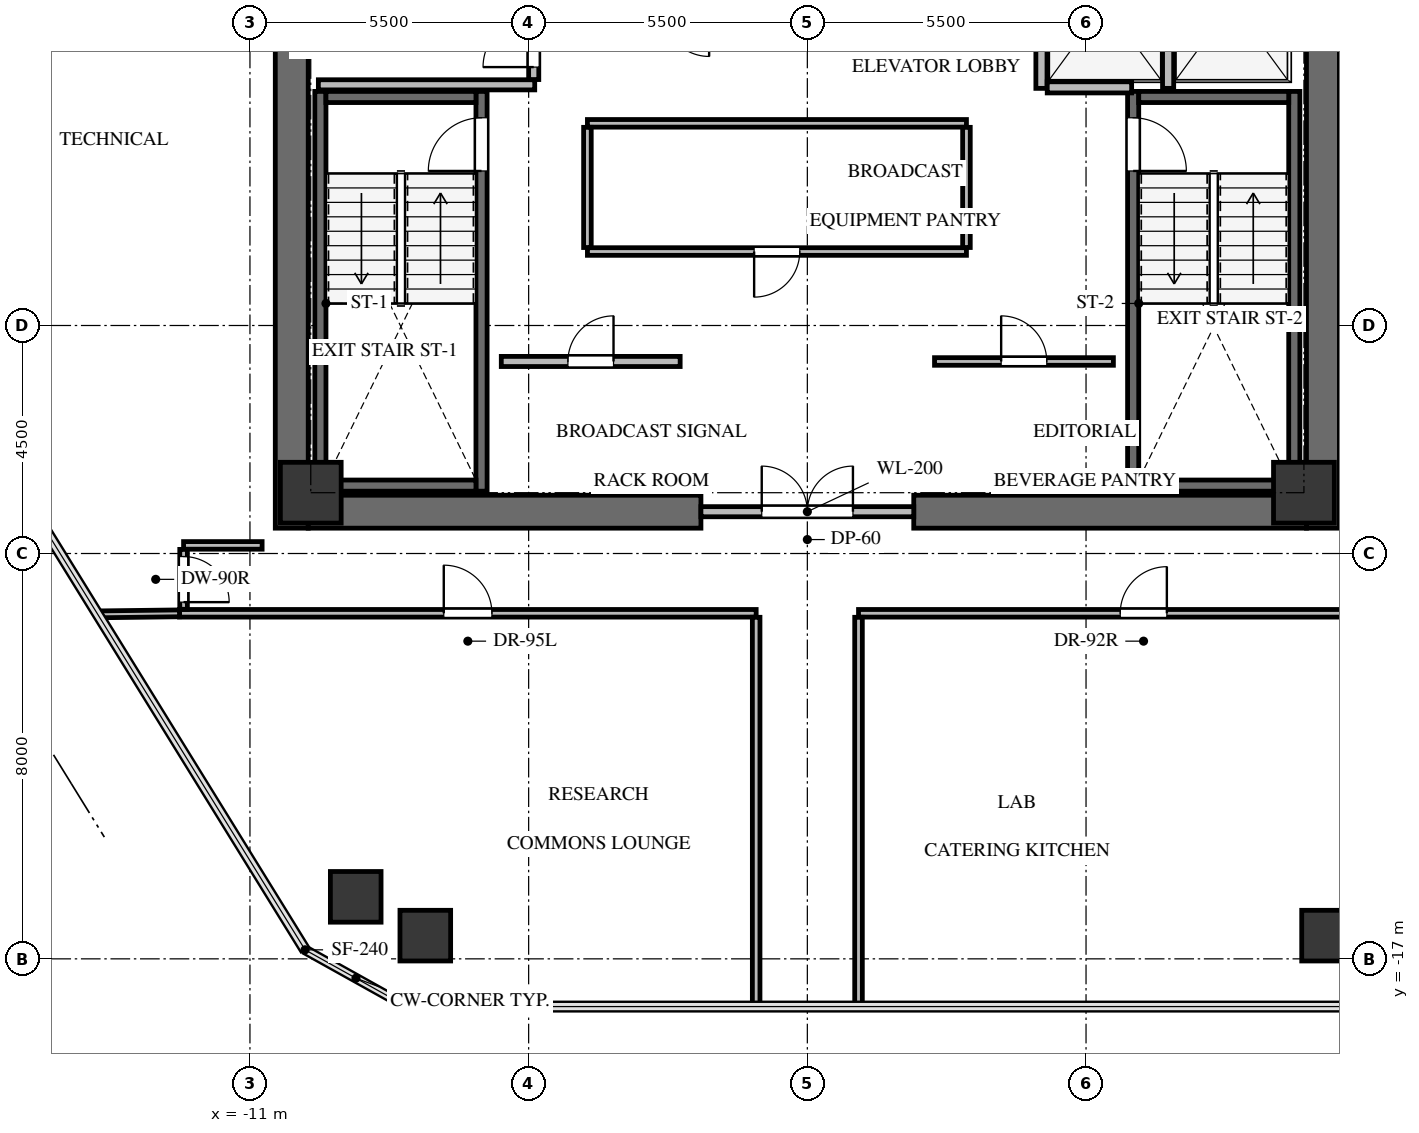
"""IFC4 building model, lengths in metres.
Left out: names, types, materials, properties, quantities, classifications, styles, units other than length and angle.
Written with IfcOpenShell. Run it as: python <this file> out.ifc"""

import sys

from ifc_helpers import new_model, si_unit, direction, frame, frame_2d, origin, origin_2d, place, context, subcontext, project, spatial, rectangle, extrude, source, transform, mapped, element, fill, save


model = new_model("IFC4")
c1 = context("Model", 3, precision=1e-05, world=origin(), true_north=direction((0.0, 1.0)))
c2 = subcontext(c1, "Body", "Model", "MODEL_VIEW")
j1 = project(units=[si_unit("LENGTHUNIT", "METRE"), si_unit("PLANEANGLEUNIT", "RADIAN")], contexts=[c1])
p1 = place(None, origin())
s1 = spatial("IfcSite", under=j1, at=p1, CompositionType="ELEMENT")
p2 = place(p1, origin())
s2 = spatial("IfcBuilding", under=s1, at=p2, CompositionType="ELEMENT")
p3 = place(p2, frame((0.0, 0.0, 170.5)))
s3 = spatial("IfcBuildingStorey", under=s2, at=p3, CompositionType="ELEMENT", Elevation=170.5)
for number, where, z_axis, x_axis in (
    (1, (-10.175, -8.5, 0.0), (0.0, 0.0, 1.0), (0.0, 1.0, 0.0)),
    (2, (10.175, -8.5, 0.0), (0.0, 0.0, 1.0), (0.0, 1.0, 0.0)),
):
    element("IfcWall", number, at=place(p3, frame(where, z_axis=z_axis, x_axis=x_axis)), inside=s3, PredefinedType="SHEAR", context=c2, shape_type="SweptSolid", body=[
        extrude(rectangle(XDim=17.0, YDim=0.65, at=frame_2d((8.5, 0.0))), origin(), (0.0, 0.0, 1.0), 3.3),
    ])
for number, where, z_axis, x_axis in (
    (3, (-9.85, -8.175, 0.0), (0.0, 0.0, 1.0), (1.0, 0.0, 0.0)),
    (4, (2.1, -8.175, 0.0), (0.0, 0.0, 1.0), (1.0, 0.0, 0.0)),
):
    element("IfcWall", number, at=place(p3, frame(where, z_axis=z_axis, x_axis=x_axis)), inside=s3, PredefinedType="SHEAR", context=c2, shape_type="SweptSolid", body=[
        extrude(rectangle(XDim=7.75, YDim=0.65, at=frame_2d((3.875, 0.0))), origin(), (0.0, 0.0, 1.0), 3.3),
    ])
p4 = place(p3, frame((-6.43, -7.77, -0.24), z_axis=(0.0, 0.0, 1.0), x_axis=(0.0, 1.0, 0.0)))
e5 = element("IfcWall", 5, at=p4, inside=s3, PredefinedType="SHEAR", context=c2, shape_type="SweptSolid", body=[
    extrude(rectangle(XDim=7.89, YDim=0.22, at=frame_2d((3.945, 0.0))), origin(), (0.0, 0.0, 1.0), 3.3),
])
p5 = place(p4, frame((6.32, 0.0, 0.0)))
e6 = element("IfcOpeningElement", 6, at=p5, cuts=e5, PredefinedType="OPENING", context=c2, shape_type="SweptSolid", body=[
    extrude(rectangle(XDim=1.05, YDim=2.15, at=frame_2d((0.525, 1.075))), frame((0.0, 0.12, 0.0), z_axis=(0.0, -1.0, 0.0), x_axis=(1.0, 0.0, 0.0)), (0.0, 0.0, 1.0), 0.24),
])
p6 = place(p3, frame((-9.61, 0.12, -0.24), z_axis=(0.0, 0.0, 1.0), x_axis=(0.0, -1.0, 0.0)))
e7 = element("IfcWall", 7, at=p6, inside=s3, PredefinedType="SHEAR", context=c2, shape_type="SweptSolid", body=[
    extrude(rectangle(XDim=7.89, YDim=0.22, at=frame_2d((3.945, 0.0))), origin(), (0.0, 0.0, 1.0), 3.3),
])
for number, where, z_axis, x_axis in (
    (8, (-9.5, -7.66, -0.24), (0.0, 0.0, 1.0), (1.0, 0.0, 0.0)),
    (9, (-6.54, 0.01, -0.24), (0.0, 0.0, 1.0), (-1.0, 0.0, 0.0)),
):
    element("IfcWall", number, at=place(p3, frame(where, z_axis=z_axis, x_axis=x_axis)), inside=s3, PredefinedType="SHEAR", context=c2, shape_type="SweptSolid", body=[
        extrude(rectangle(XDim=2.96, YDim=0.22, at=frame_2d((1.48, 0.0))), origin(), (0.0, 0.0, 1.0), 3.3),
    ])
p7 = place(p3, frame((9.61, -7.77, -0.24), z_axis=(0.0, 0.0, 1.0), x_axis=(0.0, 1.0, 0.0)))
e10 = element("IfcWall", 10, at=p7, inside=s3, PredefinedType="SHEAR", context=c2, shape_type="SweptSolid", body=[
    extrude(rectangle(XDim=7.89, YDim=0.22, at=frame_2d((3.945, 0.0))), origin(), (0.0, 0.0, 1.0), 3.3),
])
p8 = place(p3, frame((6.43, 0.12, -0.24), z_axis=(0.0, 0.0, 1.0), x_axis=(0.0, -1.0, 0.0)))
e11 = element("IfcWall", 11, at=p8, inside=s3, PredefinedType="SHEAR", context=c2, shape_type="SweptSolid", body=[
    extrude(rectangle(XDim=7.89, YDim=0.22, at=frame_2d((3.945, 0.0))), origin(), (0.0, 0.0, 1.0), 3.3),
])
p9 = place(p8, frame((0.52, 0.0, 0.0)))
e12 = element("IfcOpeningElement", 12, at=p9, cuts=e11, PredefinedType="OPENING", context=c2, shape_type="SweptSolid", body=[
    extrude(rectangle(XDim=1.05, YDim=2.15, at=frame_2d((0.525, 1.075))), frame((0.0, 0.12, 0.0), z_axis=(0.0, -1.0, 0.0), x_axis=(1.0, 0.0, 0.0)), (0.0, 0.0, 1.0), 0.24),
])
for number, where, z_axis, x_axis in (
    (13, (6.54, -7.66, -0.24), (0.0, 0.0, 1.0), (1.0, 0.0, 0.0)),
    (14, (9.5, 0.01, -0.24), (0.0, 0.0, 1.0), (-1.0, 0.0, 0.0)),
):
    element("IfcWall", number, at=place(p3, frame(where, z_axis=z_axis, x_axis=x_axis)), inside=s3, PredefinedType="SHEAR", context=c2, shape_type="SweptSolid", body=[
        extrude(rectangle(XDim=2.96, YDim=0.22, at=frame_2d((1.48, 0.0))), origin(), (0.0, 0.0, 1.0), 3.3),
    ])
m1 = source(origin(), c2, "Body", "SweptSolid", [
    extrude(rectangle(XDim=1.2, YDim=1.2, at=origin_2d()), origin(), (0.0, 0.0, 1.0), 3.3),
])
for number, where, z_axis, x_axis in (
    (15, (-9.8, -7.8, -0.24), (0.0, 0.0, 1.0), (1.0, 0.0, 0.0)),
    (16, (9.8, -7.8, -0.24), (0.0, 0.0, 1.0), (1.0, 0.0, 0.0)),
):
    element("IfcColumn", number, at=place(p3, frame(where, z_axis=z_axis, x_axis=x_axis)), inside=s3, PredefinedType="COLUMN", context=c2, shape_type="MappedRepresentation", body=[
        mapped(m1, transform((0.0, 0.0, 0.0), x_axis=(1.0, 0.0, 0.0), y_axis=(0.0, 1.0, 0.0), z_axis=(0.0, 0.0, 1.0), scale=1.0)),
    ])
m2 = source(origin(), c2, "Body", "SweptSolid", [
    extrude(rectangle(XDim=1.0, YDim=1.0, at=origin_2d()), origin(), (0.0, 0.0, 1.0), 3.3),
])
for number, where, z_axis, x_axis in (
    (17, (-8.913, -15.776, -0.24), (0.0, 0.0, 1.0), (1.0, 0.0, 0.0)),
    (18, (10.257, -16.542, -0.24), (0.0, 0.0, 1.0), (1.0, 0.0, 0.0)),
    (19, (-7.54, -16.542, -0.24), (0.0, 0.0, 1.0), (1.0, 0.0, 0.0)),
):
    element("IfcColumn", number, at=place(p3, frame(where, z_axis=z_axis, x_axis=x_axis)), inside=s3, PredefinedType="COLUMN", context=c2, shape_type="MappedRepresentation", body=[
        mapped(m2, transform((0.0, 0.0, 0.0), x_axis=(1.0, 0.0, 0.0), y_axis=(0.0, 1.0, 0.0), z_axis=(0.0, 0.0, 1.0), scale=1.0)),
    ])
p10 = place(p3, frame((-2.1, -8.175, 0.0), z_axis=(0.0, 0.0, 1.0), x_axis=(1.0, 0.0, 0.0)))
e20 = element("IfcWall", 20, at=p10, inside=s3, PredefinedType="SOLIDWALL", context=c2, shape_type="SweptSolid", body=[
    extrude(rectangle(XDim=4.2, YDim=0.2, at=frame_2d((2.1, 0.0))), origin(), (0.0, 0.0, 1.0), 3.045),
])
p11 = place(p10, frame((1.2, 0.0, 0.0)))
e21 = element("IfcOpeningElement", 21, at=p11, cuts=e20, PredefinedType="OPENING", context=c2, shape_type="SweptSolid", body=[
    extrude(rectangle(XDim=1.8, YDim=2.15, at=frame_2d((0.9, 1.075))), frame((0.0, 0.11, 0.0), z_axis=(0.0, -1.0, 0.0), x_axis=(1.0, 0.0, 0.0)), (0.0, 0.0, 1.0), 0.22),
])
p12 = place(p3, frame((-9.65, 0.25, 0.0), z_axis=(0.0, 0.0, 1.0), x_axis=(1.0, 0.0, 0.0)))
e22 = element("IfcWall", 22, at=p12, inside=s3, PredefinedType="SOLIDWALL", context=c2, shape_type="SweptSolid", body=[
    extrude(rectangle(XDim=4.27, YDim=0.2, at=frame_2d((2.135, 0.0))), origin(), (0.0, 0.0, 1.0), 3.045),
])
p13 = place(p3, frame((-5.4, 0.354, 0.0), z_axis=(0.0, 0.0, 1.0), x_axis=(0.0, 1.0, 0.0)))
e23 = element("IfcWall", 23, at=p13, inside=s3, PredefinedType="SOLIDWALL", context=c2, shape_type="SweptSolid", body=[
    extrude(rectangle(XDim=4.026, YDim=0.2, at=frame_2d((2.013, 0.0))), origin(), (0.0, 0.0, 1.0), 3.045),
])
p14 = place(p13, frame((0.246, 0.0, 0.0)))
e24 = element("IfcOpeningElement", 24, at=p14, cuts=e23, PredefinedType="OPENING", context=c2, shape_type="SweptSolid", body=[
    extrude(rectangle(XDim=1.0, YDim=2.15, at=frame_2d((0.5, 1.075))), frame((0.0, 0.11, 0.0), z_axis=(0.0, -1.0, 0.0), x_axis=(1.0, 0.0, 0.0)), (0.0, 0.0, 1.0), 0.22),
])
for number, where, z_axis, x_axis in (
    (25, (4.62, 0.18, 0.0), (0.0, 0.0, 1.0), (0.0, 1.0, 0.0)),
    (26, (7.12, 0.18, 0.0), (0.0, 0.0, 1.0), (0.0, 1.0, 0.0)),
):
    element("IfcWall", number, at=place(p3, frame(where, z_axis=z_axis, x_axis=x_axis)), inside=s3, PredefinedType="SOLIDWALL", context=c2, shape_type="SweptSolid", body=[
        extrude(rectangle(XDim=3.186, YDim=0.22, at=frame_2d((1.593, 0.0))), origin(), (0.0, 0.0, 1.0), 3.045),
    ])
p15 = place(p3, frame((4.734, 0.2, 0.0), z_axis=(0.0, 0.0, 1.0), x_axis=(1.0, 0.0, 0.0)))
e27 = element("IfcWall", 27, at=p15, inside=s3, PredefinedType="SOLIDWALL", context=c2, shape_type="SweptSolid", body=[
    extrude(rectangle(XDim=1.666, YDim=0.22, at=frame_2d((0.833, 0.0))), origin(), (0.0, 0.0, 1.0), 3.045),
])
p16 = place(p3, frame((-6.04, -5.21, 0.0), z_axis=(0.0, 0.0, 1.0), x_axis=(1.0, 0.0, 0.0)))
e28 = element("IfcWall", 28, at=p16, inside=s3, PredefinedType="SOLIDWALL", context=c2, shape_type="SweptSolid", body=[
    extrude(rectangle(XDim=3.53, YDim=0.2, at=frame_2d((1.765, 0.0))), origin(), (0.0, 0.0, 1.0), 3.045),
])
p17 = place(p16, frame((1.315, 0.0, 0.0)))
e29 = element("IfcOpeningElement", 29, at=p17, cuts=e28, PredefinedType="OPENING", context=c2, shape_type="SweptSolid", body=[
    extrude(rectangle(XDim=0.9, YDim=2.05, at=frame_2d((0.45, 1.025))), frame((0.0, 0.11, 0.0), z_axis=(0.0, -1.0, 0.0), x_axis=(1.0, 0.0, 0.0)), (0.0, 0.0, 1.0), 0.22),
])
p18 = place(p3, frame((2.51, -5.21, 0.0), z_axis=(0.0, 0.0, 1.0), x_axis=(1.0, 0.0, 0.0)))
e30 = element("IfcWall", 30, at=p18, inside=s3, PredefinedType="PARTITIONING", context=c2, shape_type="SweptSolid", body=[
    extrude(rectangle(XDim=3.53, YDim=0.15, at=frame_2d((1.765, 0.0))), origin(), (0.0, 0.0, 1.0), 3.045),
])
p19 = place(p18, frame((1.315, 0.0, 0.0)))
e31 = element("IfcOpeningElement", 31, at=p19, cuts=e30, PredefinedType="OPENING", context=c2, shape_type="SweptSolid", body=[
    extrude(rectangle(XDim=0.9, YDim=2.05, at=frame_2d((0.45, 1.025))), frame((0.0, 0.085, 0.0), z_axis=(0.0, -1.0, 0.0), x_axis=(1.0, 0.0, 0.0)), (0.0, 0.0, 1.0), 0.17),
])
p20 = place(p3, frame((3.14, -3.04, 0.0), z_axis=(0.0, 0.0, 1.0), x_axis=(-1.0, 0.0, 0.0)))
e32 = element("IfcWall", 32, at=p20, inside=s3, PredefinedType="PARTITIONING", context=c2, shape_type="SweptSolid", body=[
    extrude(rectangle(XDim=7.48, YDim=0.15, at=frame_2d((3.74, 0.0))), origin(), (0.0, 0.0, 1.0), 3.045),
])
p21 = place(p20, frame((3.29, 0.0, 0.0)))
e33 = element("IfcOpeningElement", 33, at=p21, cuts=e32, PredefinedType="OPENING", context=c2, shape_type="SweptSolid", body=[
    extrude(rectangle(XDim=0.9, YDim=2.05, at=frame_2d((0.45, 1.025))), frame((0.0, 0.085, 0.0), z_axis=(0.0, -1.0, 0.0), x_axis=(1.0, 0.0, 0.0)), (0.0, 0.0, 1.0), 0.17),
])
p22 = place(p3, frame((-4.34, -0.51, 0.0), z_axis=(0.0, 0.0, 1.0), x_axis=(1.0, 0.0, 0.0)))
e34 = element("IfcWall", 34, at=p22, inside=s3, PredefinedType="PARTITIONING", context=c2, shape_type="SweptSolid", body=[
    extrude(rectangle(XDim=7.48, YDim=0.15, at=frame_2d((3.74, 0.0))), origin(), (0.0, 0.0, 1.0), 3.045),
])
for number, where, z_axis, x_axis in (
    (35, (-4.34, -2.961, 0.0), (0.0, 0.0, 1.0), (0.0, 1.0, 0.0)),
    (36, (3.14, -0.589, 0.0), (0.0, 0.0, 1.0), (0.0, -1.0, 0.0)),
):
    element("IfcWall", number, at=place(p3, frame(where, z_axis=z_axis, x_axis=x_axis)), inside=s3, PredefinedType="PARTITIONING", context=c2, shape_type="SweptSolid", body=[
        extrude(rectangle(XDim=2.372, YDim=0.15, at=frame_2d((1.186, 0.0))), origin(), (0.0, 0.0, 1.0), 3.045),
    ])
p23 = place(p3, frame((-12.39, -10.18, 0.0), z_axis=(0.0, 0.0, 1.0), x_axis=(1.0, 0.0, 0.0)))
e37 = element("IfcWall", 37, at=p23, inside=s3, PredefinedType="PARTITIONING", context=c2, shape_type="SweptSolid", body=[
    extrude(rectangle(XDim=11.38, YDim=0.15, at=frame_2d((5.69, 0.0))), origin(), (0.0, 0.0, 1.0), 2.242),
])
p24 = place(p23, frame((5.215, 0.0, 0.0)))
e38 = element("IfcOpeningElement", 38, at=p24, cuts=e37, PredefinedType="OPENING", context=c2, shape_type="SweptSolid", body=[
    extrude(rectangle(XDim=0.95, YDim=2.1, at=frame_2d((0.475, 1.05))), frame((0.0, 0.085, 0.0), z_axis=(0.0, -1.0, 0.0), x_axis=(1.0, 0.0, 0.0)), (0.0, 0.0, 1.0), 0.17),
])
p25 = place(p3, frame((-1.01, -10.259, 0.0), z_axis=(0.0, 0.0, 1.0), x_axis=(0.0, -1.0, 0.0)))
e39 = element("IfcWall", 39, at=p25, inside=s3, PredefinedType="PARTITIONING", context=c2, shape_type="SweptSolid", body=[
    extrude(rectangle(XDim=7.683, YDim=0.15, at=frame_2d((3.841, 0.0))), origin(), (0.0, 0.0, 1.0), 2.399),
])
p26 = place(p3, frame((1.01, -10.18, 0.0), z_axis=(0.0, 0.0, 1.0), x_axis=(1.0, 0.0, 0.0)))
e40 = element("IfcWall", 40, at=p26, inside=s3, PredefinedType="PARTITIONING", context=c2, shape_type="SweptSolid", body=[
    extrude(rectangle(XDim=11.25, YDim=0.15, at=frame_2d((5.625, 0.0))), origin(), (0.0, 0.0, 1.0), 2.242),
])
p27 = place(p26, frame((5.165, 0.0, 0.0)))
e41 = element("IfcOpeningElement", 41, at=p27, cuts=e40, PredefinedType="OPENING", context=c2, shape_type="SweptSolid", body=[
    extrude(rectangle(XDim=0.92, YDim=2.1, at=frame_2d((0.46, 1.05))), frame((0.0, 0.085, 0.0), z_axis=(0.0, -1.0, 0.0), x_axis=(1.0, 0.0, 0.0)), (0.0, 0.0, 1.0), 0.17),
])
p28 = place(p3, frame((1.01, -17.942, 0.0), z_axis=(0.0, 0.0, 1.0), x_axis=(0.0, 1.0, 0.0)))
e42 = element("IfcWall", 42, at=p28, inside=s3, PredefinedType="PARTITIONING", context=c2, shape_type="SweptSolid", body=[
    extrude(rectangle(XDim=7.683, YDim=0.15, at=frame_2d((3.841, 0.0))), origin(), (0.0, 0.0, 1.0), 2.399),
])
p29 = place(p3, frame((-10.76, -8.84, 0.0), z_axis=(0.0, 0.0, 1.0), x_axis=(-1.0, 0.0, 0.0)))
e43 = element("IfcWall", 43, at=p29, inside=s3, PredefinedType="PARTITIONING", context=c2, shape_type="SweptSolid", body=[
    extrude(rectangle(XDim=1.55, YDim=0.15, at=frame_2d((0.775, 0.0))), origin(), (0.0, 0.0, 1.0), 3.045),
])
p30 = place(p3, frame((-12.31, -8.919, 0.0), z_axis=(0.0, 0.0, 1.0), x_axis=(0.0, -1.0, 0.0)))
e44 = element("IfcWall", 44, at=p30, inside=s3, PredefinedType="PARTITIONING", context=c2, shape_type="SweptSolid", body=[
    extrude(rectangle(XDim=1.182, YDim=0.15, at=frame_2d((0.591, 0.0))), origin(), (0.0, 0.0, 1.0), 2.399),
])
p31 = place(p30, frame((0.141, 0.0, 0.0)))
e45 = element("IfcOpeningElement", 45, at=p31, cuts=e44, PredefinedType="OPENING", context=c2, shape_type="SweptSolid", body=[
    extrude(rectangle(XDim=0.9, YDim=2.05, at=frame_2d((0.45, 1.025))), frame((0.0, 0.085, 0.0), z_axis=(0.0, -1.0, 0.0), x_axis=(1.0, 0.0, 0.0)), (0.0, 0.0, 1.0), 0.17),
])
p32 = place(p3, frame((-14.004, -10.201, 0.0), z_axis=(0.0, 0.0, 1.0), x_axis=(0.999923084603, 0.012402615782, 0.0)))
e46 = element("IfcWall", 46, at=p32, inside=s3, PredefinedType="PARTITIONING", context=c2, shape_type="SweptSolid", body=[
    extrude(rectangle(XDim=1.614, YDim=0.135, at=frame_2d((0.807, 0.0))), origin(), (0.0, 0.0, 1.0), 2.399),
])
m3 = source(origin(), c2, "Body", "SweptSolid", [
    extrude(rectangle(XDim=1.05, YDim=2.15, at=frame_2d((0.525, 1.075))), frame((0.0, 0.025, 0.0), z_axis=(0.0, -1.0, 0.0), x_axis=(1.0, 0.0, 0.0)), (0.0, 0.0, 1.0), 0.05),
])
p33 = place(p5, origin())
e47 = element("IfcDoor", 47, at=p33, inside=s3, OperationType="SINGLE_SWING_LEFT", PredefinedType="DOOR", context=c2, shape_type="MappedRepresentation", body=[
    mapped(m3, transform((0.0, 0.0, 0.0), x_axis=(1.0, 0.0, 0.0), y_axis=(0.0, 1.0, 0.0), z_axis=(0.0, 0.0, 1.0), scale=1.0)),
])
fill(e6, e47)
m4 = source(origin(), c2, "Body", "SweptSolid", [
    extrude(rectangle(XDim=1.05, YDim=2.15, at=frame_2d((0.525, 1.075))), frame((0.0, 0.025, 0.0), z_axis=(0.0, -1.0, 0.0), x_axis=(1.0, 0.0, 0.0)), (0.0, 0.0, 1.0), 0.05),
])
p34 = place(p9, origin())
e48 = element("IfcDoor", 48, at=p34, inside=s3, OperationType="SINGLE_SWING_RIGHT", PredefinedType="DOOR", context=c2, shape_type="MappedRepresentation", body=[
    mapped(m4, transform((0.0, 0.0, 0.0), x_axis=(1.0, 0.0, 0.0), y_axis=(0.0, 1.0, 0.0), z_axis=(0.0, 0.0, 1.0), scale=1.0)),
])
fill(e12, e48)
m5 = source(origin(), c2, "Body", "SweptSolid", [
    extrude(rectangle(XDim=1.8, YDim=2.15, at=frame_2d((0.9, 1.075))), frame((0.0, 0.025, 0.0), z_axis=(0.0, -1.0, 0.0), x_axis=(1.0, 0.0, 0.0)), (0.0, 0.0, 1.0), 0.05),
])
p35 = place(p11, origin())
e49 = element("IfcDoor", 49, at=p35, inside=s3, OperationType="DOUBLE_DOOR_SINGLE_SWING", PredefinedType="DOOR", context=c2, shape_type="MappedRepresentation", body=[
    mapped(m5, transform((0.0, 0.0, 0.0), x_axis=(1.0, 0.0, 0.0), y_axis=(0.0, 1.0, 0.0), z_axis=(0.0, 0.0, 1.0), scale=1.0)),
])
fill(e21, e49)
m6 = source(origin(), c2, "Body", "SweptSolid", [
    extrude(rectangle(XDim=1.0, YDim=2.15, at=frame_2d((0.5, 1.075))), frame((0.0, 0.025, 0.0), z_axis=(0.0, -1.0, 0.0), x_axis=(1.0, 0.0, 0.0)), (0.0, 0.0, 1.0), 0.05),
])
p36 = place(p14, origin())
e50 = element("IfcDoor", 50, at=p36, inside=s3, OperationType="SINGLE_SWING_LEFT", PredefinedType="DOOR", context=c2, shape_type="MappedRepresentation", body=[
    mapped(m6, transform((0.0, 0.0, 0.0), x_axis=(1.0, 0.0, 0.0), y_axis=(0.0, 1.0, 0.0), z_axis=(0.0, 0.0, 1.0), scale=1.0)),
])
fill(e24, e50)
m7 = source(origin(), c2, "Body", "SweptSolid", [
    extrude(rectangle(XDim=0.9, YDim=2.05, at=frame_2d((0.45, 1.025))), frame((0.0, 0.025, 0.0), z_axis=(0.0, -1.0, 0.0), x_axis=(1.0, 0.0, 0.0)), (0.0, 0.0, 1.0), 0.05),
])
p37 = place(p17, origin())
e51 = element("IfcDoor", 51, at=p37, inside=s3, OperationType="SINGLE_SWING_RIGHT", PredefinedType="DOOR", context=c2, shape_type="MappedRepresentation", body=[
    mapped(m7, transform((0.0, 0.0, 0.0), x_axis=(1.0, 0.0, 0.0), y_axis=(0.0, 1.0, 0.0), z_axis=(0.0, 0.0, 1.0), scale=1.0)),
])
fill(e29, e51)
m8 = source(origin(), c2, "Body", "SweptSolid", [
    extrude(rectangle(XDim=0.9, YDim=2.05, at=frame_2d((0.45, 1.025))), frame((0.0, 0.025, 0.0), z_axis=(0.0, -1.0, 0.0), x_axis=(1.0, 0.0, 0.0)), (0.0, 0.0, 1.0), 0.05),
])
p38 = place(p19, origin())
e52 = element("IfcDoor", 52, at=p38, inside=s3, OperationType="SINGLE_SWING_LEFT", PredefinedType="DOOR", context=c2, shape_type="MappedRepresentation", body=[
    mapped(m8, transform((0.0, 0.0, 0.0), x_axis=(1.0, 0.0, 0.0), y_axis=(0.0, 1.0, 0.0), z_axis=(0.0, 0.0, 1.0), scale=1.0)),
])
fill(e31, e52)
p39 = place(p21, origin())
e53 = element("IfcDoor", 53, at=p39, inside=s3, OperationType="SINGLE_SWING_RIGHT", PredefinedType="DOOR", context=c2, shape_type="MappedRepresentation", body=[
    mapped(m7, transform((0.0, 0.0, 0.0), x_axis=(1.0, 0.0, 0.0), y_axis=(0.0, 1.0, 0.0), z_axis=(0.0, 0.0, 1.0), scale=1.0)),
])
fill(e33, e53)
m9 = source(origin(), c2, "Body", "SweptSolid", [
    extrude(rectangle(XDim=0.95, YDim=2.1, at=frame_2d((0.475, 1.05))), frame((0.0, 0.025, 0.0), z_axis=(0.0, -1.0, 0.0), x_axis=(1.0, 0.0, 0.0)), (0.0, 0.0, 1.0), 0.05),
])
p40 = place(p24, origin())
e54 = element("IfcDoor", 54, at=p40, inside=s3, OperationType="SINGLE_SWING_LEFT", PredefinedType="DOOR", context=c2, shape_type="MappedRepresentation", body=[
    mapped(m9, transform((0.0, 0.0, 0.0), x_axis=(1.0, 0.0, 0.0), y_axis=(0.0, 1.0, 0.0), z_axis=(0.0, 0.0, 1.0), scale=1.0)),
])
fill(e38, e54)
m10 = source(origin(), c2, "Body", "SweptSolid", [
    extrude(rectangle(XDim=0.92, YDim=2.1, at=frame_2d((0.46, 1.05))), frame((0.0, 0.025, 0.0), z_axis=(0.0, -1.0, 0.0), x_axis=(1.0, 0.0, 0.0)), (0.0, 0.0, 1.0), 0.05),
])
p41 = place(p27, origin())
e55 = element("IfcDoor", 55, at=p41, inside=s3, OperationType="SINGLE_SWING_RIGHT", PredefinedType="DOOR", context=c2, shape_type="MappedRepresentation", body=[
    mapped(m10, transform((0.0, 0.0, 0.0), x_axis=(1.0, 0.0, 0.0), y_axis=(0.0, 1.0, 0.0), z_axis=(0.0, 0.0, 1.0), scale=1.0)),
])
fill(e41, e55)
m11 = source(origin(), c2, "Body", "SweptSolid", [
    extrude(rectangle(XDim=0.9, YDim=2.05, at=frame_2d((0.45, 1.025))), frame((0.0, 0.025, 0.0), z_axis=(0.0, -1.0, 0.0), x_axis=(1.0, 0.0, 0.0)), (0.0, 0.0, 1.0), 0.05),
])
p42 = place(p31, origin())
e56 = element("IfcDoor", 56, at=p42, inside=s3, OperationType="SINGLE_SWING_RIGHT", PredefinedType="DOOR", context=c2, shape_type="MappedRepresentation", body=[
    mapped(m11, transform((0.0, 0.0, 0.0), x_axis=(1.0, 0.0, 0.0), y_axis=(0.0, 1.0, 0.0), z_axis=(0.0, 0.0, 1.0), scale=1.0)),
])
fill(e45, e56)
save(model, sys.argv[1])
